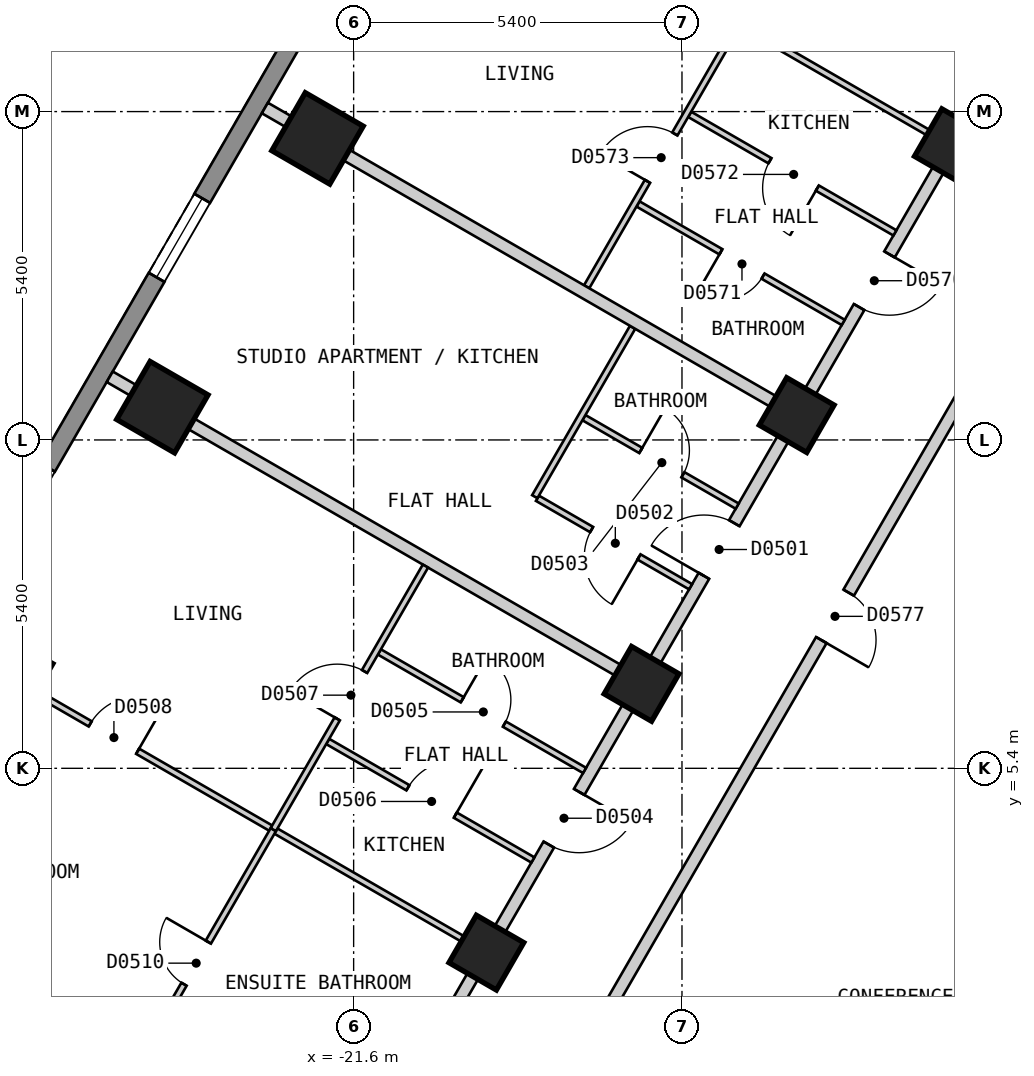
"""IFC4 building model, lengths in metres.
Left out: names, types, materials, properties, quantities, classifications, styles, units other than length and angle.
Written with IfcOpenShell. Run it as: python <this file> out.ifc"""

import sys

from ifc_helpers import new_model, si_unit, direction, frame, frame_2d, origin, origin_2d, place, context, subcontext, project, spatial, polyline, rectangle, outline, extrude, element, fill, save


model = new_model("IFC4")
c1 = context("Model", 3, precision=1e-05, world=origin(), true_north=direction((0.0, 1.0)))
c2 = subcontext(c1, "Body", "Model", "MODEL_VIEW")
j1 = project(units=[si_unit("LENGTHUNIT", "METRE"), si_unit("PLANEANGLEUNIT", "RADIAN")], contexts=[c1])
p1 = place(None, origin())
s1 = spatial("IfcSite", under=j1, at=p1, CompositionType="ELEMENT")
p2 = place(p1, origin())
s2 = spatial("IfcBuilding", under=s1, at=p2, CompositionType="ELEMENT")
p3 = place(p2, frame((0.0, 0.0, 56.4)))
s3 = spatial("IfcBuildingStorey", under=s2, at=p3, CompositionType="ELEMENT", Elevation=56.4)
for number, where, z_axis, x_axis in (
    (1, (-22.194, 15.759, 0.0), (0.0, 0.0, 1.0), (-0.5, -0.866, 0.0)),
    (2, (-24.746, 11.339, 0.0), (0.0, 0.0, 1.0), (-0.5, -0.866, 0.0)),
    (3, (-27.298, 6.919, 0.0), (0.0, 0.0, 1.0), (-0.5, -0.866, 0.0)),
):
    element("IfcColumn", number, at=place(p3, frame(where, z_axis=z_axis, x_axis=x_axis)), inside=s3, PredefinedType="COLUMN", context=c2, shape_type="SweptSolid", body=[
        extrude(rectangle(XDim=1.1, YDim=1.1, at=origin_2d()), origin(), (0.0, 0.0, 1.0), 3.0),
    ])
for number, where, z_axis, x_axis in (
    (4, (-11.761, 15.63, 0.0), (0.0, 0.0, 1.0), (-0.5, -0.866, 0.0)),
    (5, (-14.313, 11.209, 0.0), (0.0, 0.0, 1.0), (-0.5, -0.866, 0.0)),
    (6, (-16.865, 6.789, 0.0), (0.0, 0.0, 1.0), (-0.5, -0.866, 0.0)),
    (7, (-19.417, 2.369, 0.0), (0.0, 0.0, 1.0), (-0.5, -0.866, 0.0)),
):
    element("IfcColumn", number, at=place(p3, frame(where, z_axis=z_axis, x_axis=x_axis)), inside=s3, PredefinedType="COLUMN", context=c2, shape_type="SweptSolid", body=[
        extrude(rectangle(XDim=0.9, YDim=0.9, at=origin_2d()), origin(), (0.0, 0.0, 1.0), 3.0),
    ])
p4 = place(p3, frame((-17.71, 25.825, 0.0), z_axis=(0.0, 0.0, 1.0), x_axis=(-0.500001938803, -0.866024284413, 0.0)))
e8 = element("IfcWall", 8, at=p4, inside=s3, PredefinedType="SOLIDWALL", context=c2, shape_type="SweptSolid", body=[
    extrude(outline(polyline([(0.0, -0.15), (27.02, -0.15), (26.94, 0.15), (0.08, 0.15), (0.0, -0.15)])), origin(), (0.0, 0.0, 1.0), 2.7),
])
p5 = place(p4, frame((2.553, 0.0, 0.15)))
e9 = element("IfcOpeningElement", 9, at=p5, cuts=e8, PredefinedType="OPENING", context=c2, shape_type="SweptSolid", body=[
    extrude(rectangle(XDim=1.5, YDim=2.1, at=frame_2d((0.75, 1.05))), frame((0.0, 0.16, 0.0), z_axis=(0.0, -1.0, 0.0), x_axis=(1.0, 0.0, 0.0)), (0.0, 0.0, 1.0), 0.32),
])
p6 = place(p4, frame((7.658, 0.0, 0.15)))
e10 = element("IfcOpeningElement", 10, at=p6, cuts=e8, PredefinedType="OPENING", context=c2, shape_type="SweptSolid", body=[
    extrude(rectangle(XDim=1.5, YDim=2.1, at=frame_2d((0.75, 1.05))), frame((0.0, 0.16, 0.0), z_axis=(0.0, -1.0, 0.0), x_axis=(1.0, 0.0, 0.0)), (0.0, 0.0, 1.0), 0.32),
])
p7 = place(p4, frame((12.761, 0.0, 0.15)))
e11 = element("IfcOpeningElement", 11, at=p7, cuts=e8, PredefinedType="OPENING", context=c2, shape_type="SweptSolid", body=[
    extrude(rectangle(XDim=1.5, YDim=2.1, at=frame_2d((0.75, 1.05))), frame((0.0, 0.16, 0.0), z_axis=(0.0, -1.0, 0.0), x_axis=(1.0, 0.0, 0.0)), (0.0, 0.0, 1.0), 0.32),
])
p8 = place(p4, frame((17.865, 0.0, 0.15)))
e12 = element("IfcOpeningElement", 12, at=p8, cuts=e8, PredefinedType="OPENING", context=c2, shape_type="SweptSolid", body=[
    extrude(rectangle(XDim=1.5, YDim=2.1, at=frame_2d((0.75, 1.05))), frame((0.0, 0.16, 0.0), z_axis=(0.0, -1.0, 0.0), x_axis=(1.0, 0.0, 0.0)), (0.0, 0.0, 1.0), 0.32),
])
p9 = place(p4, frame((22.969, 0.0, 0.15)))
e13 = element("IfcOpeningElement", 13, at=p9, cuts=e8, PredefinedType="OPENING", context=c2, shape_type="SweptSolid", body=[
    extrude(rectangle(XDim=1.5, YDim=2.1, at=frame_2d((0.75, 1.05))), frame((0.0, 0.16, 0.0), z_axis=(0.0, -1.0, 0.0), x_axis=(1.0, 0.0, 0.0)), (0.0, 0.0, 1.0), 0.32),
])
p10 = place(p3, frame((-18.244, -0.001, 0.0), z_axis=(0.0, 0.0, 1.0), x_axis=(0.499962999376, 0.866046765051, 0.0)))
e14 = element("IfcWall", 14, at=p10, inside=s3, PredefinedType="PARTITIONING", context=c2, shape_type="SweptSolid", body=[
    extrude(rectangle(XDim=18.245, YDim=0.2, at=frame_2d((9.123, 0.0))), origin(), (0.0, 0.0, 1.0), 2.7),
])
p11 = place(p10, frame((8.672, 0.0, 0.0)))
e15 = element("IfcOpeningElement", 15, at=p11, cuts=e14, PredefinedType="OPENING", context=c2, shape_type="SweptSolid", body=[
    extrude(rectangle(XDim=0.9, YDim=2.1, at=frame_2d((0.45, 1.05))), frame((0.0, 0.11, 0.0), z_axis=(0.0, -1.0, 0.0), x_axis=(1.0, 0.0, 0.0)), (0.0, 0.0, 1.0), 0.22),
])
p12 = place(p3, frame((-20.727, 0.099, 0.0), z_axis=(0.0, 0.0, 1.0), x_axis=(0.499993204491, 0.866029327138, 0.0)))
e16 = element("IfcWall", 16, at=p12, inside=s3, PredefinedType="PARTITIONING", context=c2, shape_type="SweptSolid", body=[
    extrude(rectangle(XDim=20.554, YDim=0.2, at=frame_2d((10.277, 0.0))), origin(), (0.0, 0.0, 1.0), 2.7),
])
p13 = place(p12, frame((9.776, 0.0, 0.0)))
e17 = element("IfcOpeningElement", 17, at=p13, cuts=e16, PredefinedType="OPENING", context=c2, shape_type="SweptSolid", body=[
    extrude(rectangle(XDim=1.0, YDim=2.1, at=frame_2d((0.5, 1.05))), frame((0.0, 0.11, 0.0), z_axis=(0.0, -1.0, 0.0), x_axis=(1.0, 0.0, 0.0)), (0.0, 0.0, 1.0), 0.22),
])
p14 = place(p12, frame((4.673, 0.0, 0.0)))
e18 = element("IfcOpeningElement", 18, at=p14, cuts=e16, PredefinedType="OPENING", context=c2, shape_type="SweptSolid", body=[
    extrude(rectangle(XDim=1.0, YDim=2.1, at=frame_2d((0.5, 1.05))), frame((0.0, 0.11, 0.0), z_axis=(0.0, -1.0, 0.0), x_axis=(1.0, 0.0, 0.0)), (0.0, 0.0, 1.0), 0.22),
])
p15 = place(p12, frame((14.88, 0.0, 0.0)))
e19 = element("IfcOpeningElement", 19, at=p15, cuts=e16, PredefinedType="OPENING", context=c2, shape_type="SweptSolid", body=[
    extrude(rectangle(XDim=1.0, YDim=2.1, at=frame_2d((0.5, 1.05))), frame((0.0, 0.11, 0.0), z_axis=(0.0, -1.0, 0.0), x_axis=(1.0, 0.0, 0.0)), (0.0, 0.0, 1.0), 0.22),
])
p16 = place(p3, frame((-21.177, 7.314, 0.0), z_axis=(0.0, 0.0, 1.0), x_axis=(0.865979019114, -0.500080332001, 0.0)))
e20 = element("IfcWall", 20, at=p16, inside=s3, PredefinedType="PARTITIONING", context=c2, shape_type="SweptSolid", body=[
    extrude(rectangle(XDim=3.897, YDim=0.1, at=frame_2d((1.949, 0.0))), origin(), (0.0, 0.0, 1.0), 2.7),
])
p17 = place(p16, frame((1.574, 0.0, 0.0)))
e21 = element("IfcOpeningElement", 21, at=p17, cuts=e20, PredefinedType="OPENING", context=c2, shape_type="SweptSolid", body=[
    extrude(rectangle(XDim=0.8, YDim=2.1, at=frame_2d((0.4, 1.05))), frame((0.0, 0.06, 0.0), z_axis=(0.0, -1.0, 0.0), x_axis=(1.0, 0.0, 0.0)), (0.0, 0.0, 1.0), 0.12),
])
p18 = place(p3, frame((-22.027, 5.842, 0.0), z_axis=(0.0, 0.0, 1.0), x_axis=(0.865979019114, -0.500080332001, 0.0)))
e22 = element("IfcWall", 22, at=p18, inside=s3, PredefinedType="PARTITIONING", context=c2, shape_type="SweptSolid", body=[
    extrude(rectangle(XDim=3.897, YDim=0.1, at=frame_2d((1.949, 0.0))), origin(), (0.0, 0.0, 1.0), 2.7),
])
p19 = place(p18, frame((1.524, 0.0, 0.0)))
e23 = element("IfcOpeningElement", 23, at=p19, cuts=e22, PredefinedType="OPENING", context=c2, shape_type="SweptSolid", body=[
    extrude(rectangle(XDim=0.9, YDim=2.1, at=frame_2d((0.45, 1.05))), frame((0.0, 0.06, 0.0), z_axis=(0.0, -1.0, 0.0), x_axis=(1.0, 0.0, 0.0)), (0.0, 0.0, 1.0), 0.12),
])
p20 = place(p3, frame((-28.164, 7.419, 0.0), z_axis=(0.0, 0.0, 1.0), x_axis=(0.866047370643, -0.499961950354, 0.0)))
e24 = element("IfcWall", 24, at=p20, inside=s3, PredefinedType="PARTITIONING", context=c2, shape_type="SweptSolid", body=[
    extrude(rectangle(XDim=10.001, YDim=0.1, at=frame_2d((5.0, 0.0))), origin(), (0.0, 0.0, 1.0), 2.7),
])
p21 = place(p20, frame((2.577, 0.0, 0.0)))
e25 = element("IfcOpeningElement", 25, at=p21, cuts=e24, PredefinedType="OPENING", context=c2, shape_type="SweptSolid", body=[
    extrude(rectangle(XDim=0.9, YDim=2.1, at=frame_2d((0.45, 1.05))), frame((0.0, 0.06, 0.0), z_axis=(0.0, -1.0, 0.0), x_axis=(1.0, 0.0, 0.0)), (0.0, 0.0, 1.0), 0.12),
])
p22 = place(p3, frame((-18.577, 9.841, 0.0), z_axis=(0.0, 0.0, 1.0), x_axis=(0.865899003441, -0.500218867937, 0.0)))
e26 = element("IfcWall", 26, at=p22, inside=s3, PredefinedType="PARTITIONING", context=c2, shape_type="SweptSolid", body=[
    extrude(rectangle(XDim=2.909, YDim=0.1, at=frame_2d((1.455, 0.0))), origin(), (0.0, 0.0, 1.0), 2.7),
])
p23 = place(p22, frame((1.029, 0.0, 0.0)))
e27 = element("IfcOpeningElement", 27, at=p23, cuts=e26, PredefinedType="OPENING", context=c2, shape_type="SweptSolid", body=[
    extrude(rectangle(XDim=0.9, YDim=2.1, at=frame_2d((0.45, 1.05))), frame((0.0, 0.06, 0.0), z_axis=(0.0, -1.0, 0.0), x_axis=(1.0, 0.0, 0.0)), (0.0, 0.0, 1.0), 0.12),
])
p24 = place(p3, frame((-30.716, 2.999, 0.0), z_axis=(0.0, 0.0, 1.0), x_axis=(0.866025981722, -0.499998998981, 0.0)))
e28 = element("IfcWall", 28, at=p24, inside=s3, PredefinedType="PARTITIONING", context=c2, shape_type="SweptSolid", body=[
    extrude(rectangle(XDim=5.884, YDim=0.1, at=frame_2d((2.942, 0.0))), origin(), (0.0, 0.0, 1.0), 2.7),
])
p25 = place(p24, frame((2.55, 0.0, 0.0)))
e29 = element("IfcOpeningElement", 29, at=p25, cuts=e28, PredefinedType="OPENING", context=c2, shape_type="SweptSolid", body=[
    extrude(rectangle(XDim=0.9, YDim=2.1, at=frame_2d((0.45, 1.05))), frame((0.0, 0.06, 0.0), z_axis=(0.0, -1.0, 0.0), x_axis=(1.0, 0.0, 0.0)), (0.0, 0.0, 1.0), 0.12),
])
p26 = place(p3, frame((-16.923, 14.681, 0.0), z_axis=(0.0, 0.0, 1.0), x_axis=(0.866087525071, -0.499892387336, 0.0)))
e30 = element("IfcWall", 30, at=p26, inside=s3, PredefinedType="PARTITIONING", context=c2, shape_type="SweptSolid", body=[
    extrude(rectangle(XDim=3.897, YDim=0.1, at=frame_2d((1.948, 0.0))), origin(), (0.0, 0.0, 1.0), 2.7),
])
p27 = place(p26, frame((1.574, 0.0, 0.0)))
e31 = element("IfcOpeningElement", 31, at=p27, cuts=e30, PredefinedType="OPENING", context=c2, shape_type="SweptSolid", body=[
    extrude(rectangle(XDim=0.8, YDim=2.1, at=frame_2d((0.4, 1.05))), frame((0.0, 0.06, 0.0), z_axis=(0.0, -1.0, 0.0), x_axis=(1.0, 0.0, 0.0)), (0.0, 0.0, 1.0), 0.12),
])
p28 = place(p3, frame((-16.073, 16.154, 0.0), z_axis=(0.0, 0.0, 1.0), x_axis=(0.865979019114, -0.500080332001, 0.0)))
e32 = element("IfcWall", 32, at=p28, inside=s3, PredefinedType="PARTITIONING", context=c2, shape_type="SweptSolid", body=[
    extrude(rectangle(XDim=3.897, YDim=0.1, at=frame_2d((1.949, 0.0))), origin(), (0.0, 0.0, 1.0), 2.7),
])
p29 = place(p28, frame((1.524, 0.0, 0.0)))
e33 = element("IfcOpeningElement", 33, at=p29, cuts=e32, PredefinedType="OPENING", context=c2, shape_type="SweptSolid", body=[
    extrude(rectangle(XDim=0.9, YDim=2.1, at=frame_2d((0.45, 1.05))), frame((0.0, 0.06, 0.0), z_axis=(0.0, -1.0, 0.0), x_axis=(1.0, 0.0, 0.0)), (0.0, 0.0, 1.0), 0.12),
])
p30 = place(p3, frame((-17.813, 11.167, 0.0), z_axis=(0.0, 0.0, 1.0), x_axis=(0.866087824531, -0.499891868507, 0.0)))
e34 = element("IfcWall", 34, at=p30, inside=s3, PredefinedType="PARTITIONING", context=c2, shape_type="SweptSolid", body=[
    extrude(rectangle(XDim=2.911, YDim=0.1, at=frame_2d((1.456, 0.0))), origin(), (0.0, 0.0, 1.0), 2.7),
])
p31 = place(p30, frame((1.08, 0.0, 0.0)))
e35 = element("IfcOpeningElement", 35, at=p31, cuts=e34, PredefinedType="OPENING", context=c2, shape_type="SweptSolid", body=[
    extrude(rectangle(XDim=0.8, YDim=2.1, at=frame_2d((0.4, 1.05))), frame((0.0, 0.06, 0.0), z_axis=(0.0, -1.0, 0.0), x_axis=(1.0, 0.0, 0.0)), (0.0, 0.0, 1.0), 0.12),
])
p32 = place(p3, frame((-20.508, 20.679, 0.0), z_axis=(0.0, 0.0, 1.0), x_axis=(0.866047370643, -0.499961950354, 0.0)))
e36 = element("IfcWall", 36, at=p32, inside=s3, PredefinedType="PARTITIONING", context=c2, shape_type="SweptSolid", body=[
    extrude(rectangle(XDim=10.001, YDim=0.1, at=frame_2d((5.0, 0.0))), origin(), (0.0, 0.0, 1.0), 2.7),
])
p33 = place(p32, frame((2.576, 0.0, 0.0)))
e37 = element("IfcOpeningElement", 37, at=p33, cuts=e36, PredefinedType="OPENING", context=c2, shape_type="SweptSolid", body=[
    extrude(rectangle(XDim=0.9, YDim=2.1, at=frame_2d((0.45, 1.05))), frame((0.0, 0.06, 0.0), z_axis=(0.0, -1.0, 0.0), x_axis=(1.0, 0.0, 0.0)), (0.0, 0.0, 1.0), 0.12),
])
p34 = place(p3, frame((-18.621, 9.867, 0.0), z_axis=(0.0, 0.0, 1.0), x_axis=(0.500197891286, 0.865911121047, 0.0)))
e38 = element("IfcWall", 38, at=p34, inside=s3, PredefinedType="PARTITIONING", context=c2, shape_type="SweptSolid", body=[
    extrude(rectangle(XDim=3.215, YDim=0.1, at=frame_2d((1.607, 0.0))), origin(), (0.0, 0.0, 1.0), 2.7),
])
p35 = place(p3, frame((-25.358, 0.173, 0.0), z_axis=(0.0, 0.0, 1.0), x_axis=(0.500180754623, 0.8659210199, 0.0)))
e39 = element("IfcWall", 39, at=p35, inside=s3, PredefinedType="PARTITIONING", context=c2, shape_type="SweptSolid", body=[
    extrude(rectangle(XDim=4.872, YDim=0.1, at=frame_2d((2.436, 0.0))), origin(), (0.0, 0.0, 1.0), 2.7),
])
p36 = place(p35, frame((1.936, 0.0, 0.0)))
e40 = element("IfcOpeningElement", 40, at=p36, cuts=e39, PredefinedType="OPENING", context=c2, shape_type="SweptSolid", body=[
    extrude(rectangle(XDim=0.8, YDim=2.1, at=frame_2d((0.4, 1.05))), frame((0.0, 0.06, 0.0), z_axis=(0.0, -1.0, 0.0), x_axis=(1.0, 0.0, 0.0)), (0.0, 0.0, 1.0), 0.12),
])
p37 = place(p3, frame((-17.768, 13.319, 0.0), z_axis=(0.0, 0.0, 1.0), x_axis=(0.499958946799, 0.866049104564, 0.0)))
e41 = element("IfcWall", 41, at=p37, inside=s3, PredefinedType="PARTITIONING", context=c2, shape_type="SweptSolid", body=[
    extrude(rectangle(XDim=5.004, YDim=0.1, at=frame_2d((2.502, 0.0))), origin(), (0.0, 0.0, 1.0), 2.7),
])
p38 = place(p37, frame((2.002, 0.0, 0.0)))
e42 = element("IfcOpeningElement", 42, at=p38, cuts=e41, PredefinedType="OPENING", context=c2, shape_type="SweptSolid", body=[
    extrude(rectangle(XDim=0.9, YDim=2.1, at=frame_2d((0.45, 1.05))), frame((0.0, 0.06, 0.0), z_axis=(0.0, -1.0, 0.0), x_axis=(1.0, 0.0, 0.0)), (0.0, 0.0, 1.0), 0.12),
])
p39 = place(p3, frame((-25.611, 11.839, 0.0), z_axis=(0.0, 0.0, 1.0), x_axis=(0.866022959057, -0.500004234368, 0.0)))
e43 = element("IfcWall", 43, at=p39, inside=s3, PredefinedType="PARTITIONING", context=c2, shape_type="SweptSolid", body=[
    extrude(rectangle(XDim=10.0, YDim=0.2, at=frame_2d((5.0, 0.0))), origin(), (0.0, 0.0, 1.0), 2.7),
])
p40 = place(p3, frame((-23.06, 16.259, 0.0), z_axis=(0.0, 0.0, 1.0), x_axis=(0.866047370643, -0.499961950354, 0.0)))
e44 = element("IfcWall", 44, at=p40, inside=s3, PredefinedType="PARTITIONING", context=c2, shape_type="SweptSolid", body=[
    extrude(rectangle(XDim=10.001, YDim=0.2, at=frame_2d((5.0, 0.0))), origin(), (0.0, 0.0, 1.0), 2.7),
])
p41 = place(p3, frame((-22.921, 4.392, 0.0), z_axis=(0.0, 0.0, 1.0), x_axis=(0.499958946799, 0.866049104564, 0.0)))
e45 = element("IfcWall", 45, at=p41, inside=s3, PredefinedType="PARTITIONING", context=c2, shape_type="SweptSolid", body=[
    extrude(rectangle(XDim=5.004, YDim=0.1, at=frame_2d((2.502, 0.0))), origin(), (0.0, 0.0, 1.0), 2.7),
])
p42 = place(p41, frame((2.103, 0.0, 0.0)))
e46 = element("IfcOpeningElement", 46, at=p42, cuts=e45, PredefinedType="OPENING", context=c2, shape_type="SweptSolid", body=[
    extrude(rectangle(XDim=0.9, YDim=2.1, at=frame_2d((0.45, 1.05))), frame((0.0, 0.06, 0.0), z_axis=(0.0, -1.0, 0.0), x_axis=(1.0, 0.0, 0.0)), (0.0, 0.0, 1.0), 0.12),
])
p43 = place(p7, origin())
e47 = element("IfcWindow", 47, at=p43, inside=s3, PartitioningType="SINGLE_PANEL", PredefinedType="WINDOW", context=c2, shape_type="SweptSolid", body=[
    extrude(rectangle(XDim=1.5, YDim=2.1, at=frame_2d((0.75, 1.05))), frame((0.0, 0.03, 0.0), z_axis=(0.0, -1.0, 0.0), x_axis=(1.0, 0.0, 0.0)), (0.0, 0.0, 1.0), 0.06),
])
fill(e11, e47)
p44 = place(p13, origin())
e48 = element("IfcDoor", 48, at=p44, inside=s3, OperationType="SINGLE_SWING_LEFT", PredefinedType="DOOR", context=c2, shape_type="SweptSolid", body=[
    extrude(rectangle(XDim=1.0, YDim=2.1, at=frame_2d((0.5, 1.05))), frame((0.0, 0.025, 0.0), z_axis=(0.0, -1.0, 0.0), x_axis=(1.0, 0.0, 0.0)), (0.0, 0.0, 1.0), 0.05),
])
fill(e17, e48)
p45 = place(p23, origin())
e49 = element("IfcDoor", 49, at=p45, inside=s3, OperationType="SINGLE_SWING_RIGHT", PredefinedType="DOOR", context=c2, shape_type="SweptSolid", body=[
    extrude(rectangle(XDim=0.9, YDim=2.1, at=frame_2d((0.45, 1.05))), frame((0.0, 0.025, 0.0), z_axis=(0.0, -1.0, 0.0), x_axis=(1.0, 0.0, 0.0)), (0.0, 0.0, 1.0), 0.05),
])
fill(e27, e49)
p46 = place(p31, origin())
e50 = element("IfcDoor", 50, at=p46, inside=s3, OperationType="SINGLE_SWING_LEFT", PredefinedType="DOOR", context=c2, shape_type="SweptSolid", body=[
    extrude(rectangle(XDim=0.8, YDim=2.1, at=frame_2d((0.4, 1.05))), frame((0.0, 0.025, 0.0), z_axis=(0.0, -1.0, 0.0), x_axis=(1.0, 0.0, 0.0)), (0.0, 0.0, 1.0), 0.05),
])
fill(e35, e50)
p47 = place(p14, origin())
e51 = element("IfcDoor", 51, at=p47, inside=s3, OperationType="SINGLE_SWING_RIGHT", PredefinedType="DOOR", context=c2, shape_type="SweptSolid", body=[
    extrude(rectangle(XDim=1.0, YDim=2.1, at=frame_2d((0.5, 1.05))), frame((0.0, 0.025, 0.0), z_axis=(0.0, -1.0, 0.0), x_axis=(1.0, 0.0, 0.0)), (0.0, 0.0, 1.0), 0.05),
])
fill(e18, e51)
p48 = place(p17, origin())
e52 = element("IfcDoor", 52, at=p48, inside=s3, OperationType="SINGLE_SWING_LEFT", PredefinedType="DOOR", context=c2, shape_type="SweptSolid", body=[
    extrude(rectangle(XDim=0.8, YDim=2.1, at=frame_2d((0.4, 1.05))), frame((0.0, 0.025, 0.0), z_axis=(0.0, -1.0, 0.0), x_axis=(1.0, 0.0, 0.0)), (0.0, 0.0, 1.0), 0.05),
])
fill(e21, e52)
p49 = place(p19, origin())
e53 = element("IfcDoor", 53, at=p49, inside=s3, OperationType="SINGLE_SWING_RIGHT", PredefinedType="DOOR", context=c2, shape_type="SweptSolid", body=[
    extrude(rectangle(XDim=0.9, YDim=2.1, at=frame_2d((0.45, 1.05))), frame((0.0, 0.025, 0.0), z_axis=(0.0, -1.0, 0.0), x_axis=(1.0, 0.0, 0.0)), (0.0, 0.0, 1.0), 0.05),
])
fill(e23, e53)
p50 = place(p42, origin())
e54 = element("IfcDoor", 54, at=p50, inside=s3, OperationType="SINGLE_SWING_LEFT", PredefinedType="DOOR", context=c2, shape_type="SweptSolid", body=[
    extrude(rectangle(XDim=0.9, YDim=2.1, at=frame_2d((0.45, 1.05))), frame((0.0, 0.025, 0.0), z_axis=(0.0, -1.0, 0.0), x_axis=(1.0, 0.0, 0.0)), (0.0, 0.0, 1.0), 0.05),
])
fill(e46, e54)
p51 = place(p21, origin())
e55 = element("IfcDoor", 55, at=p51, inside=s3, OperationType="SINGLE_SWING_RIGHT", PredefinedType="DOOR", context=c2, shape_type="SweptSolid", body=[
    extrude(rectangle(XDim=0.9, YDim=2.1, at=frame_2d((0.45, 1.05))), frame((0.0, 0.025, 0.0), z_axis=(0.0, -1.0, 0.0), x_axis=(1.0, 0.0, 0.0)), (0.0, 0.0, 1.0), 0.05),
])
fill(e25, e55)
p52 = place(p36, origin())
e56 = element("IfcDoor", 56, at=p52, inside=s3, OperationType="SINGLE_SWING_RIGHT", PredefinedType="DOOR", context=c2, shape_type="SweptSolid", body=[
    extrude(rectangle(XDim=0.8, YDim=2.1, at=frame_2d((0.4, 1.05))), frame((0.0, 0.025, 0.0), z_axis=(0.0, -1.0, 0.0), x_axis=(1.0, 0.0, 0.0)), (0.0, 0.0, 1.0), 0.05),
])
fill(e40, e56)
p53 = place(p15, origin())
e57 = element("IfcDoor", 57, at=p53, inside=s3, OperationType="SINGLE_SWING_RIGHT", PredefinedType="DOOR", context=c2, shape_type="SweptSolid", body=[
    extrude(rectangle(XDim=1.0, YDim=2.1, at=frame_2d((0.5, 1.05))), frame((0.0, 0.025, 0.0), z_axis=(0.0, -1.0, 0.0), x_axis=(1.0, 0.0, 0.0)), (0.0, 0.0, 1.0), 0.05),
])
fill(e19, e57)
p54 = place(p27, origin())
e58 = element("IfcDoor", 58, at=p54, inside=s3, OperationType="SINGLE_SWING_LEFT", PredefinedType="DOOR", context=c2, shape_type="SweptSolid", body=[
    extrude(rectangle(XDim=0.8, YDim=2.1, at=frame_2d((0.4, 1.05))), frame((0.0, 0.025, 0.0), z_axis=(0.0, -1.0, 0.0), x_axis=(1.0, 0.0, 0.0)), (0.0, 0.0, 1.0), 0.05),
])
fill(e31, e58)
p55 = place(p29, origin())
e59 = element("IfcDoor", 59, at=p55, inside=s3, OperationType="SINGLE_SWING_RIGHT", PredefinedType="DOOR", context=c2, shape_type="SweptSolid", body=[
    extrude(rectangle(XDim=0.9, YDim=2.1, at=frame_2d((0.45, 1.05))), frame((0.0, 0.025, 0.0), z_axis=(0.0, -1.0, 0.0), x_axis=(1.0, 0.0, 0.0)), (0.0, 0.0, 1.0), 0.05),
])
fill(e33, e59)
p56 = place(p38, origin())
e60 = element("IfcDoor", 60, at=p56, inside=s3, OperationType="SINGLE_SWING_LEFT", PredefinedType="DOOR", context=c2, shape_type="SweptSolid", body=[
    extrude(rectangle(XDim=0.9, YDim=2.1, at=frame_2d((0.45, 1.05))), frame((0.0, 0.025, 0.0), z_axis=(0.0, -1.0, 0.0), x_axis=(1.0, 0.0, 0.0)), (0.0, 0.0, 1.0), 0.05),
])
fill(e42, e60)
p57 = place(p11, origin())
e61 = element("IfcDoor", 61, at=p57, inside=s3, OperationType="SINGLE_SWING_LEFT", PredefinedType="DOOR", context=c2, shape_type="SweptSolid", body=[
    extrude(rectangle(XDim=0.9, YDim=2.1, at=frame_2d((0.45, 1.05))), frame((0.0, 0.025, 0.0), z_axis=(0.0, -1.0, 0.0), x_axis=(1.0, 0.0, 0.0)), (0.0, 0.0, 1.0), 0.05),
])
fill(e15, e61)
save(model, sys.argv[1])
